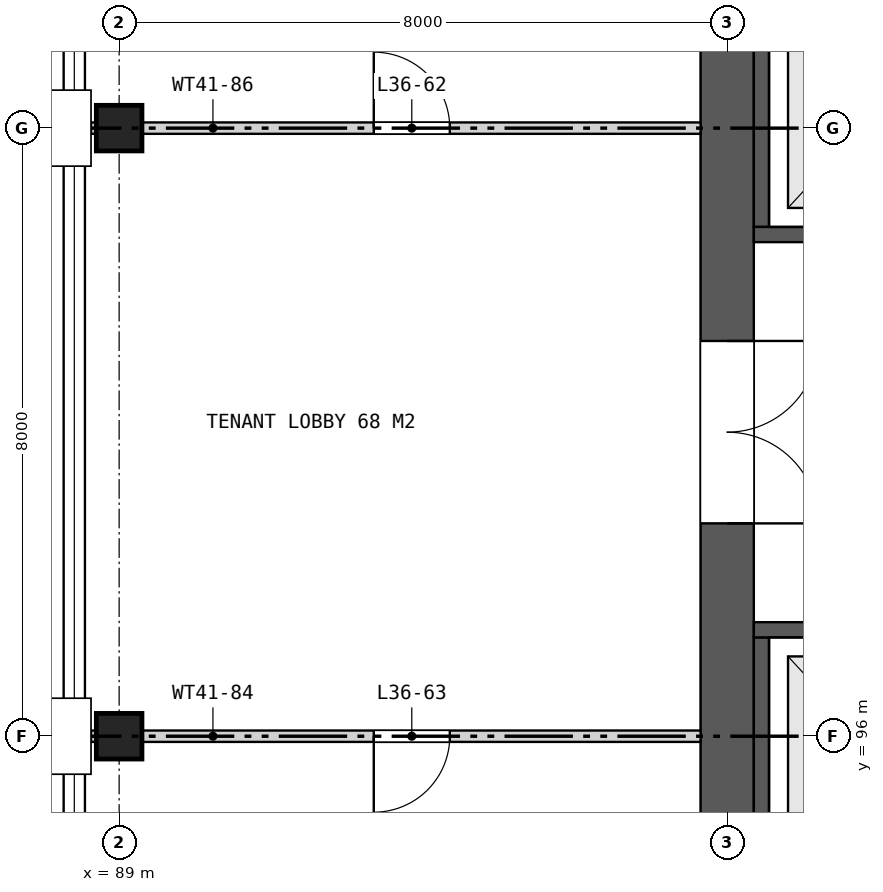
"""IFC4 building model, lengths in metres.
Left out: names, types, materials, properties, quantities, classifications, styles, units other than length and angle.
Written with IfcOpenShell. Run it as: python <this file> out.ifc"""

import sys

from ifc_helpers import new_model, si_unit, direction, frame, frame_2d, origin, origin_2d, place, context, subcontext, project, spatial, rectangle, extrude, element, fill, save


model = new_model("IFC4")
c1 = context("Model", 3, precision=1e-05, world=origin(), true_north=direction((0.0, 1.0)))
c2 = subcontext(c1, "Body", "Model", "MODEL_VIEW")
j1 = project(units=[si_unit("LENGTHUNIT", "METRE"), si_unit("PLANEANGLEUNIT", "RADIAN")], contexts=[c1])
p1 = place(None, origin())
s1 = spatial("IfcSite", under=j1, at=p1, CompositionType="ELEMENT")
p2 = place(p1, origin())
s2 = spatial("IfcBuilding", under=s1, at=p2, CompositionType="ELEMENT")
p3 = place(p2, frame((0.0, 0.0, 171.5)))
s3 = spatial("IfcBuildingStorey", under=s2, at=p3, CompositionType="ELEMENT", Elevation=171.5)
for number, where, z_axis, x_axis in (
    (1, (89.0, 96.0, 0.0), (0.0, 0.0, 1.0), (1.0, 0.0, 0.0)),
    (2, (89.0, 104.0, 0.0), (0.0, 0.0, 1.0), (1.0, 0.0, 0.0)),
):
    element("IfcColumn", number, at=place(p3, frame(where, z_axis=z_axis, x_axis=x_axis)), inside=s3, PredefinedType="COLUMN", context=c2, shape_type="SweptSolid", body=[
        extrude(rectangle(XDim=0.6, YDim=0.6, at=origin_2d()), origin(), (0.0, 0.0, 1.0), 7.4),
    ])
p4 = place(p3, frame((97.0, 111.65, 0.0), z_axis=(0.0, 0.0, 1.0), x_axis=(0.0, -1.0, 0.0)))
e3 = element("IfcWall", 3, at=p4, inside=s3, PredefinedType="SHEAR", context=c2, shape_type="SweptSolid", body=[
    extrude(rectangle(XDim=23.3, YDim=0.7, at=frame_2d((11.65, 0.0))), origin(), (0.0, 0.0, 1.0), 7.4),
])
p5 = place(p4, frame((10.45, 0.0, 0.0)))
e4 = element("IfcOpeningElement", 4, at=p5, cuts=e3, PredefinedType="OPENING", context=c2, shape_type="SweptSolid", body=[
    extrude(rectangle(XDim=2.4, YDim=2.4, at=frame_2d((1.2, 1.2))), frame((0.0, 0.36, 0.0), z_axis=(0.0, -1.0, 0.0), x_axis=(1.0, 0.0, 0.0)), (0.0, 0.0, 1.0), 0.72),
])
p6 = place(p3, frame((97.45, 97.3, 0.0), z_axis=(0.0, 0.0, 1.0), x_axis=(0.0, -1.0, 0.0)))
e5 = element("IfcWall", 5, at=p6, inside=s3, PredefinedType="SHEAR", context=c2, shape_type="SweptSolid", body=[
    extrude(rectangle(XDim=3.0, YDim=0.2, at=frame_2d((1.5, 0.0))), origin(), (0.0, 0.0, 1.0), 7.4),
])
p7 = place(p3, frame((109.4, 97.4, 0.0), z_axis=(0.0, 0.0, 1.0), x_axis=(-1.0, 0.0, 0.0)))
e6 = element("IfcWall", 6, at=p7, inside=s3, PredefinedType="SHEAR", context=c2, shape_type="SweptSolid", body=[
    extrude(rectangle(XDim=12.05, YDim=0.2, at=frame_2d((6.025, 0.0))), origin(), (0.0, 0.0, 1.0), 7.4),
])
p8 = place(p7, frame((0.85, 0.0, 0.0)))
e7 = element("IfcOpeningElement", 7, at=p8, cuts=e6, PredefinedType="OPENING", context=c2, shape_type="SweptSolid", body=[
    extrude(rectangle(XDim=1.4, YDim=2.1, at=frame_2d((0.7, 1.05))), frame((0.0, 0.11, 0.0), z_axis=(0.0, -1.0, 0.0), x_axis=(1.0, 0.0, 0.0)), (0.0, 0.0, 1.0), 0.22),
])
p9 = place(p7, frame((3.8, 0.0, 0.0)))
e8 = element("IfcOpeningElement", 8, at=p9, cuts=e6, PredefinedType="OPENING", context=c2, shape_type="SweptSolid", body=[
    extrude(rectangle(XDim=1.4, YDim=2.1, at=frame_2d((0.7, 1.05))), frame((0.0, 0.11, 0.0), z_axis=(0.0, -1.0, 0.0), x_axis=(1.0, 0.0, 0.0)), (0.0, 0.0, 1.0), 0.22),
])
p10 = place(p7, frame((6.8, 0.0, 0.0)))
e9 = element("IfcOpeningElement", 9, at=p10, cuts=e6, PredefinedType="OPENING", context=c2, shape_type="SweptSolid", body=[
    extrude(rectangle(XDim=1.4, YDim=2.1, at=frame_2d((0.7, 1.05))), frame((0.0, 0.11, 0.0), z_axis=(0.0, -1.0, 0.0), x_axis=(1.0, 0.0, 0.0)), (0.0, 0.0, 1.0), 0.22),
])
p11 = place(p7, frame((9.775, 0.0, 0.0)))
e10 = element("IfcOpeningElement", 10, at=p11, cuts=e6, PredefinedType="OPENING", context=c2, shape_type="SweptSolid", body=[
    extrude(rectangle(XDim=1.4, YDim=2.1, at=frame_2d((0.7, 1.05))), frame((0.0, 0.11, 0.0), z_axis=(0.0, -1.0, 0.0), x_axis=(1.0, 0.0, 0.0)), (0.0, 0.0, 1.0), 0.22),
])
p12 = place(p3, frame((97.45, 105.7, 0.0), z_axis=(0.0, 0.0, 1.0), x_axis=(0.0, -1.0, 0.0)))
e11 = element("IfcWall", 11, at=p12, inside=s3, PredefinedType="SHEAR", context=c2, shape_type="SweptSolid", body=[
    extrude(rectangle(XDim=3.0, YDim=0.2, at=frame_2d((1.5, 0.0))), origin(), (0.0, 0.0, 1.0), 7.4),
])
p13 = place(p3, frame((109.4, 102.6, 0.0), z_axis=(0.0, 0.0, 1.0), x_axis=(-1.0, 0.0, 0.0)))
e12 = element("IfcWall", 12, at=p13, inside=s3, PredefinedType="SHEAR", context=c2, shape_type="SweptSolid", body=[
    extrude(rectangle(XDim=12.05, YDim=0.2, at=frame_2d((6.025, 0.0))), origin(), (0.0, 0.0, 1.0), 7.4),
])
p14 = place(p13, frame((0.85, 0.0, 0.0)))
e13 = element("IfcOpeningElement", 13, at=p14, cuts=e12, PredefinedType="OPENING", context=c2, shape_type="SweptSolid", body=[
    extrude(rectangle(XDim=1.4, YDim=2.1, at=frame_2d((0.7, 1.05))), frame((0.0, 0.11, 0.0), z_axis=(0.0, -1.0, 0.0), x_axis=(1.0, 0.0, 0.0)), (0.0, 0.0, 1.0), 0.22),
])
p15 = place(p13, frame((3.8, 0.0, 0.0)))
e14 = element("IfcOpeningElement", 14, at=p15, cuts=e12, PredefinedType="OPENING", context=c2, shape_type="SweptSolid", body=[
    extrude(rectangle(XDim=1.4, YDim=2.1, at=frame_2d((0.7, 1.05))), frame((0.0, 0.11, 0.0), z_axis=(0.0, -1.0, 0.0), x_axis=(1.0, 0.0, 0.0)), (0.0, 0.0, 1.0), 0.22),
])
p16 = place(p13, frame((6.8, 0.0, 0.0)))
e15 = element("IfcOpeningElement", 15, at=p16, cuts=e12, PredefinedType="OPENING", context=c2, shape_type="SweptSolid", body=[
    extrude(rectangle(XDim=1.4, YDim=2.1, at=frame_2d((0.7, 1.05))), frame((0.0, 0.11, 0.0), z_axis=(0.0, -1.0, 0.0), x_axis=(1.0, 0.0, 0.0)), (0.0, 0.0, 1.0), 0.22),
])
p17 = place(p13, frame((9.775, 0.0, 0.0)))
e16 = element("IfcOpeningElement", 16, at=p17, cuts=e12, PredefinedType="OPENING", context=c2, shape_type="SweptSolid", body=[
    extrude(rectangle(XDim=1.4, YDim=2.1, at=frame_2d((0.7, 1.05))), frame((0.0, 0.11, 0.0), z_axis=(0.0, -1.0, 0.0), x_axis=(1.0, 0.0, 0.0)), (0.0, 0.0, 1.0), 0.22),
])
p18 = place(p3, frame((88.63, 96.0, 0.0), z_axis=(0.0, 0.0, 1.0), x_axis=(1.0, 0.0, 0.0)))
e17 = element("IfcWall", 17, at=p18, inside=s3, PredefinedType="PARTITIONING", context=c2, shape_type="SweptSolid", body=[
    extrude(rectangle(XDim=8.02, YDim=0.15, at=frame_2d((4.01, 0.0))), origin(), (0.0, 0.0, 1.0), 6.64),
])
p19 = place(p18, frame((3.72, 0.0, 0.0)))
e18 = element("IfcOpeningElement", 18, at=p19, cuts=e17, PredefinedType="OPENING", context=c2, shape_type="SweptSolid", body=[
    extrude(rectangle(XDim=1.0, YDim=2.1, at=frame_2d((0.5, 1.05))), frame((0.0, 0.085, 0.0), z_axis=(0.0, -1.0, 0.0), x_axis=(1.0, 0.0, 0.0)), (0.0, 0.0, 1.0), 0.17),
])
p20 = place(p3, frame((88.63, 104.0, 0.0), z_axis=(0.0, 0.0, 1.0), x_axis=(1.0, 0.0, 0.0)))
e19 = element("IfcWall", 19, at=p20, inside=s3, PredefinedType="PARTITIONING", context=c2, shape_type="SweptSolid", body=[
    extrude(rectangle(XDim=8.02, YDim=0.15, at=frame_2d((4.01, 0.0))), origin(), (0.0, 0.0, 1.0), 6.64),
])
p21 = place(p20, frame((3.72, 0.0, 0.0)))
e20 = element("IfcOpeningElement", 20, at=p21, cuts=e19, PredefinedType="OPENING", context=c2, shape_type="SweptSolid", body=[
    extrude(rectangle(XDim=1.0, YDim=2.1, at=frame_2d((0.5, 1.05))), frame((0.0, 0.085, 0.0), z_axis=(0.0, -1.0, 0.0), x_axis=(1.0, 0.0, 0.0)), (0.0, 0.0, 1.0), 0.17),
])
p22 = place(p5, origin())
e21 = element("IfcDoor", 21, at=p22, inside=s3, OperationType="DOUBLE_DOOR_SINGLE_SWING", PredefinedType="DOOR", context=c2, shape_type="SweptSolid", body=[
    extrude(rectangle(XDim=2.4, YDim=2.4, at=frame_2d((1.2, 1.2))), frame((0.0, 0.025, 0.0), z_axis=(0.0, -1.0, 0.0), x_axis=(1.0, 0.0, 0.0)), (0.0, 0.0, 1.0), 0.05),
])
fill(e4, e21)
p23 = place(p21, origin())
e22 = element("IfcDoor", 22, at=p23, inside=s3, OperationType="SINGLE_SWING_LEFT", PredefinedType="DOOR", context=c2, shape_type="SweptSolid", body=[
    extrude(rectangle(XDim=1.0, YDim=2.1, at=frame_2d((0.5, 1.05))), frame((0.0, 0.025, 0.0), z_axis=(0.0, -1.0, 0.0), x_axis=(1.0, 0.0, 0.0)), (0.0, 0.0, 1.0), 0.05),
])
fill(e20, e22)
p24 = place(p19, frame((1.0, 0.0, 0.0), z_axis=(0.0, 0.0, 1.0), x_axis=(-1.0, 0.0, 0.0)))
e23 = element("IfcDoor", 23, at=p24, inside=s3, OperationType="SINGLE_SWING_RIGHT", PredefinedType="DOOR", context=c2, shape_type="SweptSolid", body=[
    extrude(rectangle(XDim=1.0, YDim=2.1, at=frame_2d((0.5, 1.05))), frame((0.0, 0.025, 0.0), z_axis=(0.0, -1.0, 0.0), x_axis=(1.0, 0.0, 0.0)), (0.0, 0.0, 1.0), 0.05),
])
fill(e18, e23)
save(model, sys.argv[1])
